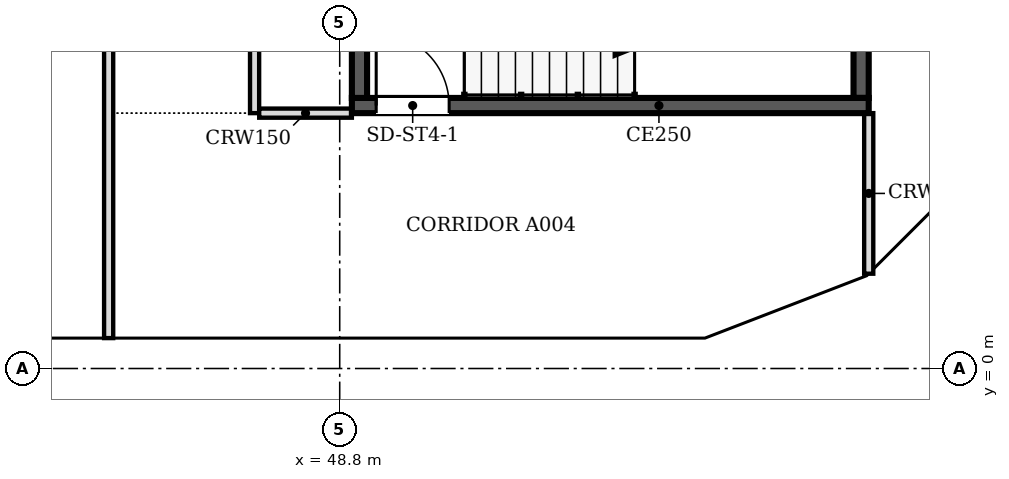
"""IFC4 building model, lengths in metres.
Left out: names, types, materials, properties, quantities, classifications, styles, units other than length and angle.
Written with IfcOpenShell. Run it as: python <this file> out.ifc"""

import sys

from ifc_helpers import new_model, si_unit, direction, frame, frame_2d, origin, place, context, subcontext, project, spatial, polyline, rectangle, outline, extrude, faceted_brep, source, transform, mapped, element, fill, save


model = new_model("IFC4")
c1 = context("Model", 3, precision=1e-05, world=origin(), true_north=direction((0.0, 1.0)))
c2 = subcontext(c1, "Body", "Model", "MODEL_VIEW")
j1 = project(units=[si_unit("LENGTHUNIT", "METRE"), si_unit("PLANEANGLEUNIT", "RADIAN")], contexts=[c1])
p1 = place(None, origin())
s1 = spatial("IfcSite", under=j1, at=p1, CompositionType="ELEMENT")
p2 = place(p1, origin())
s2 = spatial("IfcBuilding", under=s1, at=p2, CompositionType="ELEMENT")
p3 = place(p2, frame((0.0, 0.0, 99.0)))
s3 = spatial("IfcBuildingStorey", under=s2, at=p3, CompositionType="ELEMENT", Elevation=99.0)
m1 = source(origin(), c2, "Body", "SweptSolid", [
    extrude(outline(polyline([(3.05, 0.0), (6.1, 3.8), (3.05, 7.6), (0.0, 3.8), (3.05, 0.0)])), frame((0.0, 0.25, 0.0), z_axis=(0.0, -1.0, 0.0), x_axis=(1.0, 0.0, 0.0)), (0.0, 0.0, 1.0), 0.5),
])
p4 = place(p3, frame((39.65, 0.25, -3.8), z_axis=(0.0, 0.0, 1.0), x_axis=(1.0, 0.0, 0.0)))
e1 = element("IfcWall", 1, at=p4, inside=s3, PredefinedType="SOLIDWALL", context=c2, shape_type="MappedRepresentation", body=[
    mapped(m1, transform((0.0, 0.0, 0.0), scale=1.0)),
])
m2 = source(origin(), c2, "Body", "SweptSolid", [
    extrude(outline(polyline([(3.05, 0.399), (5.78, 3.8), (3.05, 7.201), (0.321, 3.8), (3.05, 0.399)])), frame((0.0, 0.26, 0.0), z_axis=(0.0, -1.0, 0.0), x_axis=(1.0, 0.0, 0.0)), (0.0, 0.0, 1.0), 0.52),
])
p5 = place(p4, origin())
e2 = element("IfcOpeningElement", 2, at=p5, cuts=e1, PredefinedType="OPENING", context=c2, shape_type="MappedRepresentation", body=[
    mapped(m2, transform((0.0, 0.0, 0.0), scale=1.0)),
])
p6 = place(p3, frame((45.75, 0.25, -3.8), z_axis=(0.0, 0.0, 1.0), x_axis=(1.0, 0.0, 0.0)))
e3 = element("IfcWall", 3, at=p6, inside=s3, PredefinedType="SOLIDWALL", context=c2, shape_type="MappedRepresentation", body=[
    mapped(m1, transform((0.0, 0.0, 0.0), scale=1.0)),
])
p7 = place(p6, origin())
e4 = element("IfcOpeningElement", 4, at=p7, cuts=e3, PredefinedType="OPENING", context=c2, shape_type="MappedRepresentation", body=[
    mapped(m2, transform((0.0, 0.0, 0.0), scale=1.0)),
])
m3 = source(origin(), c2, "Body", "Brep", [
    faceted_brep([(3.003, -0.25, 0.0), (3.05, -0.25, 0.06), (3.05, -0.25, 7.54), (3.003, -0.25, 7.6), (0.0, -0.25, 3.8), (0.0, 0.25, 3.8), (2.957, 0.25, 7.541), (2.957, 0.25, 0.059), (3.003, 0.0, 0.0), (3.003, 0.0, 7.6)], [[[0, 1, 2, 3, 4]], [[5, 6, 7]], [[1, 0, 8]], [[9, 3, 2]], [[6, 5, 4, 3, 9]], [[5, 7, 8, 0, 4]], [[1, 8, 7, 6, 9, 2]]]),
])
p8 = place(p3, frame((51.85, 0.25, -3.8), z_axis=(0.0, 0.0, 1.0), x_axis=(1.0, 0.0, 0.0)))
e5 = element("IfcWall", 5, at=p8, inside=s3, PredefinedType="SOLIDWALL", context=c2, shape_type="MappedRepresentation", body=[
    mapped(m3, transform((0.0, 0.0, 0.0), scale=1.0)),
])
m4 = source(origin(), c2, "Body", "SweptSolid", [
    extrude(outline(polyline([(2.803, 6.944), (0.319, 3.8), (2.803, 0.656), (2.803, 6.944)])), frame((0.0, 0.26, 0.0), z_axis=(0.0, -1.0, 0.0), x_axis=(1.0, 0.0, 0.0)), (0.0, 0.0, 1.0), 0.52),
])
p9 = place(p8, origin())
e6 = element("IfcOpeningElement", 6, at=p9, cuts=e5, PredefinedType="OPENING", context=c2, shape_type="MappedRepresentation", body=[
    mapped(m4, transform((0.0, 0.0, 0.0), scale=1.0)),
])
m5 = source(origin(), c2, "Body", "Brep", [
    faceted_brep([(0.047, -0.25, 0.0), (2.997, -0.25, 3.8), (0.047, -0.25, 7.6), (0.0, -0.25, 7.541), (0.0, -0.25, 0.059), (0.093, 0.25, 7.54), (2.944, 0.25, 3.868), (2.944, 0.25, 3.732), (0.093, 0.25, 0.06), (2.997, 0.0, 3.8), (0.047, 0.0, 0.0), (0.047, 0.0, 7.6)], [[[0, 1, 2, 3, 4]], [[5, 6, 7, 8]], [[8, 7, 9, 1, 0, 10]], [[6, 5, 11, 2, 1, 9]], [[3, 2, 11]], [[10, 0, 4]], [[8, 10, 4, 3, 11, 5]], [[9, 7, 6]]]),
])
p10 = place(p3, frame((54.81, 0.233, -3.8), z_axis=(0.0, 0.0, 1.0), x_axis=(0.932990326376, 0.359901446078, 0.0)))
e7 = element("IfcWall", 7, at=p10, inside=s3, PredefinedType="SOLIDWALL", context=c2, shape_type="MappedRepresentation", body=[
    mapped(m5, transform((0.0, 0.0, 0.0), scale=1.0)),
])
m6 = source(origin(), c2, "Body", "SweptSolid", [
    extrude(outline(polyline([(0.247, 0.665), (2.681, 3.8), (0.247, 6.935), (0.247, 0.665)])), frame((0.0, 0.26, 0.0), z_axis=(0.0, -1.0, 0.0), x_axis=(1.0, 0.0, 0.0)), (0.0, 0.0, 1.0), 0.52),
])
p11 = place(p10, origin())
e8 = element("IfcOpeningElement", 8, at=p11, cuts=e7, PredefinedType="OPENING", context=c2, shape_type="MappedRepresentation", body=[
    mapped(m6, transform((0.0, 0.0, 0.0), scale=1.0)),
])
m7 = source(origin(), c2, "Body", "Brep", [
    faceted_brep([(2.944, -0.25, 0.0), (2.997, -0.25, 0.068), (2.997, -0.25, 7.532), (2.944, -0.25, 7.6), (0.0, -0.25, 3.8), (0.053, 0.25, 3.868), (2.891, 0.25, 7.532), (2.891, 0.25, 0.068), (0.053, 0.25, 3.732), (2.944, 0.0, 0.0), (2.944, 0.0, 7.6), (0.0, 0.0, 3.8)], [[[0, 1, 2, 3, 4]], [[5, 6, 7, 8]], [[1, 0, 9]], [[10, 3, 2]], [[6, 5, 11, 4, 3, 10]], [[8, 7, 9, 0, 4, 11]], [[8, 11, 5]], [[1, 9, 7, 6, 10, 2]]]),
])
p12 = place(p3, frame((57.606, 1.312, -3.8), z_axis=(0.0, 0.0, 1.0), x_axis=(0.707147509625, 0.707066050402, 0.0)))
e9 = element("IfcWall", 9, at=p12, inside=s3, PredefinedType="SOLIDWALL", context=c2, shape_type="MappedRepresentation", body=[
    mapped(m7, transform((0.0, 0.0, 0.0), scale=1.0)),
])
m8 = source(origin(), c2, "Body", "SweptSolid", [
    extrude(outline(polyline([(2.744, 6.934), (0.316, 3.8), (2.744, 0.666), (2.744, 6.934)])), frame((0.0, 0.26, 0.0), z_axis=(0.0, -1.0, 0.0), x_axis=(1.0, 0.0, 0.0)), (0.0, 0.0, 1.0), 0.52),
])
p13 = place(p12, origin())
e10 = element("IfcOpeningElement", 10, at=p13, cuts=e9, PredefinedType="OPENING", context=c2, shape_type="MappedRepresentation", body=[
    mapped(m8, transform((0.0, 0.0, 0.0), scale=1.0)),
])
p14 = place(p2, frame((0.0, 0.0, 102.8)))
s4 = spatial("IfcBuildingStorey", under=s2, at=p14, CompositionType="ELEMENT", Elevation=102.8)
p15 = place(p14, frame((42.7, 0.25, -3.8), z_axis=(0.0, 0.0, 1.0), x_axis=(1.0, 0.0, 0.0)))
e11 = element("IfcWall", 11, at=p15, inside=s4, PredefinedType="SOLIDWALL", context=c2, shape_type="MappedRepresentation", body=[
    mapped(m1, transform((0.0, 0.0, 0.0), scale=1.0)),
])
p16 = place(p15, origin())
e12 = element("IfcOpeningElement", 12, at=p16, cuts=e11, PredefinedType="OPENING", context=c2, shape_type="MappedRepresentation", body=[
    mapped(m2, transform((0.0, 0.0, 0.0), scale=1.0)),
])
m9 = source(origin(), c2, "Body", "Brep", [
    faceted_brep([(3.05, -0.25, 0.0), (6.053, -0.25, 3.8), (3.05, -0.25, 7.6), (0.0, -0.25, 3.8), (0.0, 0.25, 3.8), (3.05, 0.25, 7.6), (6.007, 0.25, 3.859), (6.007, 0.25, 3.741), (3.05, 0.25, 0.0), (6.053, 0.0, 3.8)], [[[0, 1, 2, 3]], [[4, 5, 6, 7, 8]], [[8, 7, 9, 1, 0]], [[6, 5, 2, 1, 9]], [[5, 4, 3, 2]], [[4, 8, 0, 3]], [[9, 7, 6]]]),
])
p17 = place(p14, frame((48.8, 0.25, -3.8), z_axis=(0.0, 0.0, 1.0), x_axis=(1.0, 0.0, 0.0)))
e13 = element("IfcWall", 13, at=p17, inside=s4, PredefinedType="SOLIDWALL", context=c2, shape_type="MappedRepresentation", body=[
    mapped(m9, transform((0.0, 0.0, 0.0), scale=1.0)),
])
m10 = source(origin(), c2, "Body", "SweptSolid", [
    extrude(outline(polyline([(3.049, 0.401), (5.735, 3.8), (3.049, 7.199), (0.321, 3.8), (3.049, 0.401)])), frame((0.0, 0.26, 0.0), z_axis=(0.0, -1.0, 0.0), x_axis=(1.0, 0.0, 0.0)), (0.0, 0.0, 1.0), 0.52),
])
p18 = place(p17, origin())
e14 = element("IfcOpeningElement", 14, at=p18, cuts=e13, PredefinedType="OPENING", context=c2, shape_type="MappedRepresentation", body=[
    mapped(m10, transform((0.0, 0.0, 0.0), scale=1.0)),
])
m11 = source(origin(), c2, "Body", "Brep", [
    faceted_brep([(2.95, -0.25, 0.0), (3.003, -0.25, 0.068), (3.003, -0.25, 7.532), (2.95, -0.25, 7.6), (0.0, -0.25, 3.8), (0.047, 0.25, 3.86), (2.898, 0.25, 7.532), (2.898, 0.25, 0.068), (0.047, 0.25, 3.74), (2.95, 0.0, 0.0), (2.95, 0.0, 7.6), (0.0, 0.0, 3.8)], [[[0, 1, 2, 3, 4]], [[5, 6, 7, 8]], [[1, 0, 9]], [[10, 3, 2]], [[6, 5, 11, 4, 3, 10]], [[8, 7, 9, 0, 4, 11]], [[8, 11, 5]], [[1, 9, 7, 6, 10, 2]]]),
])
p19 = place(p14, frame((54.854, 0.25, -3.8), z_axis=(0.0, 0.0, 1.0), x_axis=(0.932970071518, 0.359953949349, 0.0)))
e15 = element("IfcWall", 15, at=p19, inside=s4, PredefinedType="SOLIDWALL", context=c2, shape_type="MappedRepresentation", body=[
    mapped(m11, transform((0.0, 0.0, 0.0), scale=1.0)),
])
m12 = source(origin(), c2, "Body", "SweptSolid", [
    extrude(outline(polyline([(2.75, 6.935), (0.316, 3.8), (2.75, 0.665), (2.75, 6.935)])), frame((0.0, 0.26, 0.0), z_axis=(0.0, -1.0, 0.0), x_axis=(1.0, 0.0, 0.0)), (0.0, 0.0, 1.0), 0.52),
])
p20 = place(p19, origin())
e16 = element("IfcOpeningElement", 16, at=p20, cuts=e15, PredefinedType="OPENING", context=c2, shape_type="MappedRepresentation", body=[
    mapped(m12, transform((0.0, 0.0, 0.0), scale=1.0)),
])
m13 = source(origin(), c2, "Body", "Brep", [
    faceted_brep([(0.053, -0.25, 0.0), (2.997, -0.25, 3.8), (0.053, -0.25, 7.6), (0.0, -0.25, 7.532), (0.0, -0.25, 0.068), (0.106, 0.25, 7.532), (2.944, 0.25, 3.868), (2.944, 0.25, 3.732), (0.106, 0.25, 0.068), (2.997, 0.0, 3.8), (0.053, 0.0, 0.0), (0.053, 0.0, 7.6)], [[[0, 1, 2, 3, 4]], [[5, 6, 7, 8]], [[8, 7, 9, 1, 0, 10]], [[6, 5, 11, 2, 1, 9]], [[3, 2, 11]], [[10, 0, 4]], [[8, 10, 4, 3, 11, 5]], [[9, 7, 6]]]),
])
p21 = place(p14, frame((57.569, 1.274, -3.8), z_axis=(0.0, 0.0, 1.0), x_axis=(0.707066050402, 0.707147509625, 0.0)))
e17 = element("IfcWall", 17, at=p21, inside=s4, PredefinedType="SOLIDWALL", context=c2, shape_type="MappedRepresentation", body=[
    mapped(m13, transform((0.0, 0.0, 0.0), scale=1.0)),
])
m14 = source(origin(), c2, "Body", "SweptSolid", [
    extrude(outline(polyline([(0.253, 0.666), (2.681, 3.8), (0.253, 6.934), (0.253, 0.666)])), frame((0.0, 0.26, 0.0), z_axis=(0.0, -1.0, 0.0), x_axis=(1.0, 0.0, 0.0)), (0.0, 0.0, 1.0), 0.52),
])
p22 = place(p21, origin())
e18 = element("IfcOpeningElement", 18, at=p22, cuts=e17, PredefinedType="OPENING", context=c2, shape_type="MappedRepresentation", body=[
    mapped(m14, transform((0.0, 0.0, 0.0), scale=1.0)),
])
p23 = place(p3, frame((57.5, 4.325, 0.0), z_axis=(0.0, 0.0, 1.0), x_axis=(-1.0, 0.0, 0.0)))
e19 = element("IfcWall", 19, at=p23, inside=s3, PredefinedType="SOLIDWALL", context=c2, shape_type="SweptSolid", body=[
    extrude(rectangle(XDim=8.5, YDim=0.25, at=frame_2d((4.25, 0.0))), origin(), (0.0, 0.0, 1.0), 3.8),
])
m15 = source(origin(), c2, "Body", "SweptSolid", [
    extrude(rectangle(XDim=1.2, YDim=2.1, at=frame_2d((0.6, 1.05))), frame((0.0, 0.135, 0.0), z_axis=(0.0, -1.0, 0.0), x_axis=(1.0, 0.0, 0.0)), (0.0, 0.0, 1.0), 0.27),
])
p24 = place(p23, frame((6.9, 0.0, 0.0)))
e20 = element("IfcOpeningElement", 20, at=p24, cuts=e19, PredefinedType="OPENING", context=c2, shape_type="MappedRepresentation", body=[
    mapped(m15, transform((0.0, 0.0, 0.0), scale=1.0)),
])
for number, where, z_axis, x_axis in (
    (21, (49.125, 4.45, 0.0), (0.0, 0.0, 1.0), (0.0, 1.0, 0.0)),
    (22, (57.375, 7.85, 0.0), (0.0, 0.0, 1.0), (0.0, -1.0, 0.0)),
):
    element("IfcWall", number, at=place(p3, frame(where, z_axis=z_axis, x_axis=x_axis)), inside=s3, PredefinedType="SOLIDWALL", context=c2, shape_type="SweptSolid", body=[
        extrude(rectangle(XDim=3.4, YDim=0.25, at=frame_2d((1.7, 0.0))), origin(), (0.0, 0.0, 1.0), 3.8),
    ])
p25 = place(p3, frame((45.0, 0.5, 0.0), z_axis=(0.0, 0.0, 1.0), x_axis=(0.0, 1.0, 0.0)))
e23 = element("IfcWall", 23, at=p25, inside=s3, PredefinedType="PARTITIONING", context=c2, shape_type="SweptSolid", body=[
    extrude(rectangle(XDim=21.724, YDim=0.15, at=frame_2d((10.862, 0.0))), origin(), (0.0, 0.0, 1.0), 3.067),
])
m16 = source(origin(), c2, "Body", "SweptSolid", [
    extrude(rectangle(XDim=0.9, YDim=2.1, at=frame_2d((0.45, 1.05))), frame((0.0, 0.085, 0.0), z_axis=(0.0, -1.0, 0.0), x_axis=(1.0, 0.0, 0.0)), (0.0, 0.0, 1.0), 0.17),
])
p26 = place(p25, frame((6.2, 0.0, 0.0)))
e24 = element("IfcOpeningElement", 24, at=p26, cuts=e23, PredefinedType="OPENING", context=c2, shape_type="MappedRepresentation", body=[
    mapped(m16, transform((0.0, 0.0, 0.0), scale=1.0)),
])
p27 = place(p25, frame((15.3, 0.0, 0.0)))
e25 = element("IfcOpeningElement", 25, at=p27, cuts=e23, PredefinedType="OPENING", context=c2, shape_type="MappedRepresentation", body=[
    mapped(m16, transform((0.0, 0.0, 0.0), scale=1.0)),
])
p28 = place(p3, frame((57.5, 1.559, 0.0), z_axis=(0.0, 0.0, 1.0), x_axis=(0.0, 1.0, 0.0)))
e26 = element("IfcWall", 26, at=p28, inside=s3, PredefinedType="PARTITIONING", context=c2, shape_type="SweptSolid", body=[
    extrude(rectangle(XDim=2.641, YDim=0.15, at=frame_2d((1.32, 0.0))), origin(), (0.0, 0.0, 1.0), 3.067),
])
p29 = place(p3, frame((47.4, 22.3, 0.0), z_axis=(0.0, 0.0, 1.0), x_axis=(0.0, -1.0, 0.0)))
e27 = element("IfcWall", 27, at=p29, inside=s3, PredefinedType="PARTITIONING", context=c2, shape_type="SweptSolid", body=[
    extrude(rectangle(XDim=18.1, YDim=0.15, at=frame_2d((9.05, 0.0))), origin(), (0.0, 0.0, 1.0), 3.067),
])
m17 = source(origin(), c2, "Body", "SweptSolid", [
    extrude(rectangle(XDim=1.0, YDim=2.1, at=frame_2d((0.5, 1.05))), frame((0.0, 0.085, 0.0), z_axis=(0.0, -1.0, 0.0), x_axis=(1.0, 0.0, 0.0)), (0.0, 0.0, 1.0), 0.17),
])
p30 = place(p29, frame((3.599, 0.0, 0.0)))
e28 = element("IfcOpeningElement", 28, at=p30, cuts=e27, PredefinedType="OPENING", context=c2, shape_type="MappedRepresentation", body=[
    mapped(m17, transform((0.0, 0.0, 0.0), scale=1.0)),
])
p31 = place(p29, frame((12.7, 0.0, 0.0)))
e29 = element("IfcOpeningElement", 29, at=p31, cuts=e27, PredefinedType="OPENING", context=c2, shape_type="MappedRepresentation", body=[
    mapped(m16, transform((0.0, 0.0, 0.0), scale=1.0)),
])
p32 = place(p3, frame((47.476, 4.2, 0.0), z_axis=(0.0, 0.0, 1.0), x_axis=(1.0, 0.0, 0.0)))
e30 = element("IfcWall", 30, at=p32, inside=s3, PredefinedType="PARTITIONING", context=c2, shape_type="SweptSolid", body=[
    extrude(rectangle(XDim=1.524, YDim=0.15, at=frame_2d((0.762, 0.0))), origin(), (0.0, 0.0, 1.0), 3.067),
])
m18 = source(origin(), c2, "Body", "SweptSolid", [
    extrude(rectangle(XDim=1.2, YDim=2.1, at=frame_2d((0.6, 1.05))), frame((0.0, 0.025, 0.0), z_axis=(0.0, -1.0, 0.0), x_axis=(1.0, 0.0, 0.0)), (0.0, 0.0, 1.0), 0.05),
])
p33 = place(p24, origin())
e31 = element("IfcDoor", 31, at=p33, inside=s3, OperationType="SINGLE_SWING_RIGHT", PredefinedType="DOOR", context=c2, shape_type="MappedRepresentation", body=[
    mapped(m18, transform((0.0, 0.0, 0.0), scale=1.0)),
])
fill(e20, e31)
save(model, sys.argv[1])
